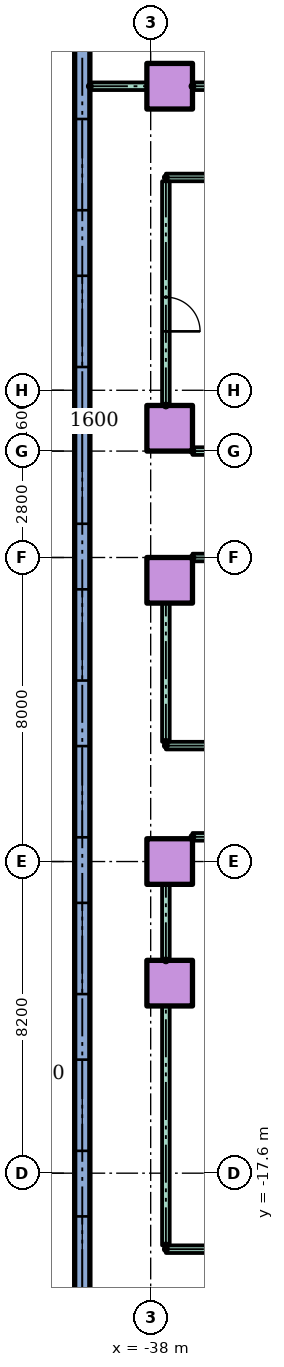
"""IFC4 building model, lengths in metres.
Left out: names, types, materials, properties, quantities, classifications, styles, units other than length and angle.
Written with IfcOpenShell. Run it as: python <this file> out.ifc"""

import sys

from ifc_helpers import new_model, si_unit, direction, frame, frame_2d, origin, origin_2d, place, context, subcontext, project, spatial, rectangle, hollow_rectangle, extrude, element, fill, save


model = new_model("IFC4")
c1 = context("Model", 3, precision=1e-05, world=origin(), true_north=direction((0.0, 1.0)))
c2 = subcontext(c1, "Body", "Model", "MODEL_VIEW")
j1 = project(units=[si_unit("LENGTHUNIT", "METRE"), si_unit("PLANEANGLEUNIT", "RADIAN")], contexts=[c1])
p1 = place(None, origin())
s1 = spatial("IfcSite", under=j1, at=p1, CompositionType="ELEMENT")
p2 = place(p1, origin())
s2 = spatial("IfcBuilding", under=s1, at=p2, CompositionType="ELEMENT")
p3 = place(p2, frame((0.0, 0.0, 14.0)))
s3 = spatial("IfcBuildingStorey", under=s2, at=p3, CompositionType="ELEMENT", Elevation=14.0)
for number, where in (
    (1, (-37.5, -12.6, 0.0)),
    (2, (-37.5, -9.4, 0.0)),
    (3, (-37.5, -2.0, 0.0)),
    (4, (-37.5, 2.0, 0.0)),
    (5, (-37.5, 11.0, 0.0)),
):
    element("IfcColumn", number, at=place(p3, frame(where)), inside=s3, PredefinedType="COLUMN", context=c2, shape_type="SweptSolid", body=[
        extrude(hollow_rectangle(XDim=1.2, YDim=1.2, WallThickness=0.06, at=origin_2d()), origin(), (0.0, 0.0, 1.0), 4.0),
    ])
p4 = place(p3, frame((-39.8, 20.0, 0.0), z_axis=(0.0, 0.0, 1.0), x_axis=(0.0, -1.0, 0.0)))
e6 = element("IfcWall", 6, at=p4, inside=s3, PredefinedType="STANDARD", context=c2, shape_type="SweptSolid", body=[
    extrude(rectangle(XDim=70.0, YDim=0.4, at=frame_2d((35.0, 0.0))), origin(), (0.0, 0.0, 1.0), 3.7),
])
p5 = place(p4, frame((1.05, 0.0, 0.9)))
e7 = element("IfcOpeningElement", 7, at=p5, cuts=e6, PredefinedType="OPENING", context=c2, shape_type="SweptSolid", body=[
    extrude(rectangle(XDim=2.4, YDim=2.1, at=frame_2d((1.2, 1.05))), frame((0.0, 0.21, 0.0), z_axis=(0.0, -1.0, 0.0), x_axis=(1.0, 0.0, 0.0)), (0.0, 0.0, 1.0), 0.42),
])
p6 = place(p4, frame((5.55, 0.0, 0.9)))
e8 = element("IfcOpeningElement", 8, at=p6, cuts=e6, PredefinedType="OPENING", context=c2, shape_type="SweptSolid", body=[
    extrude(rectangle(XDim=2.4, YDim=2.1, at=frame_2d((1.2, 1.05))), frame((0.0, 0.21, 0.0), z_axis=(0.0, -1.0, 0.0), x_axis=(1.0, 0.0, 0.0)), (0.0, 0.0, 1.0), 0.42),
])
p7 = place(p4, frame((9.863, 0.0, 0.9)))
e9 = element("IfcOpeningElement", 9, at=p7, cuts=e6, PredefinedType="OPENING", context=c2, shape_type="SweptSolid", body=[
    extrude(rectangle(XDim=2.4, YDim=2.1, at=frame_2d((1.2, 1.05))), frame((0.0, 0.21, 0.0), z_axis=(0.0, -1.0, 0.0), x_axis=(1.0, 0.0, 0.0)), (0.0, 0.0, 1.0), 0.42),
])
p8 = place(p4, frame((13.988, 0.0, 0.9)))
e10 = element("IfcOpeningElement", 10, at=p8, cuts=e6, PredefinedType="OPENING", context=c2, shape_type="SweptSolid", body=[
    extrude(rectangle(XDim=2.4, YDim=2.1, at=frame_2d((1.2, 1.05))), frame((0.0, 0.21, 0.0), z_axis=(0.0, -1.0, 0.0), x_axis=(1.0, 0.0, 0.0)), (0.0, 0.0, 1.0), 0.42),
])
p9 = place(p4, frame((18.113, 0.0, 0.9)))
e11 = element("IfcOpeningElement", 11, at=p9, cuts=e6, PredefinedType="OPENING", context=c2, shape_type="SweptSolid", body=[
    extrude(rectangle(XDim=2.4, YDim=2.1, at=frame_2d((1.2, 1.05))), frame((0.0, 0.21, 0.0), z_axis=(0.0, -1.0, 0.0), x_axis=(1.0, 0.0, 0.0)), (0.0, 0.0, 1.0), 0.42),
])
p10 = place(p4, frame((22.238, 0.0, 0.9)))
e12 = element("IfcOpeningElement", 12, at=p10, cuts=e6, PredefinedType="OPENING", context=c2, shape_type="SweptSolid", body=[
    extrude(rectangle(XDim=2.4, YDim=2.1, at=frame_2d((1.2, 1.05))), frame((0.0, 0.21, 0.0), z_axis=(0.0, -1.0, 0.0), x_axis=(1.0, 0.0, 0.0)), (0.0, 0.0, 1.0), 0.42),
])
p11 = place(p4, frame((26.363, 0.0, 0.9)))
e13 = element("IfcOpeningElement", 13, at=p11, cuts=e6, PredefinedType="OPENING", context=c2, shape_type="SweptSolid", body=[
    extrude(rectangle(XDim=2.4, YDim=2.1, at=frame_2d((1.2, 1.05))), frame((0.0, 0.21, 0.0), z_axis=(0.0, -1.0, 0.0), x_axis=(1.0, 0.0, 0.0)), (0.0, 0.0, 1.0), 0.42),
])
p12 = place(p4, frame((30.488, 0.0, 0.9)))
e14 = element("IfcOpeningElement", 14, at=p12, cuts=e6, PredefinedType="OPENING", context=c2, shape_type="SweptSolid", body=[
    extrude(rectangle(XDim=2.4, YDim=2.1, at=frame_2d((1.2, 1.05))), frame((0.0, 0.21, 0.0), z_axis=(0.0, -1.0, 0.0), x_axis=(1.0, 0.0, 0.0)), (0.0, 0.0, 1.0), 0.42),
])
p13 = place(p4, frame((34.613, 0.0, 0.9)))
e15 = element("IfcOpeningElement", 15, at=p13, cuts=e6, PredefinedType="OPENING", context=c2, shape_type="SweptSolid", body=[
    extrude(rectangle(XDim=2.4, YDim=2.1, at=frame_2d((1.2, 1.05))), frame((0.0, 0.21, 0.0), z_axis=(0.0, -1.0, 0.0), x_axis=(1.0, 0.0, 0.0)), (0.0, 0.0, 1.0), 0.42),
])
p14 = place(p4, frame((38.738, 0.0, 0.9)))
e16 = element("IfcOpeningElement", 16, at=p14, cuts=e6, PredefinedType="OPENING", context=c2, shape_type="SweptSolid", body=[
    extrude(rectangle(XDim=2.4, YDim=2.1, at=frame_2d((1.2, 1.05))), frame((0.0, 0.21, 0.0), z_axis=(0.0, -1.0, 0.0), x_axis=(1.0, 0.0, 0.0)), (0.0, 0.0, 1.0), 0.42),
])
p15 = place(p4, frame((66.85, 0.0, 0.9)))
e17 = element("IfcOpeningElement", 17, at=p15, cuts=e6, PredefinedType="OPENING", context=c2, shape_type="SweptSolid", body=[
    extrude(rectangle(XDim=2.4, YDim=2.1, at=frame_2d((1.2, 1.05))), frame((0.0, 0.21, 0.0), z_axis=(0.0, -1.0, 0.0), x_axis=(1.0, 0.0, 0.0)), (0.0, 0.0, 1.0), 0.42),
])
p16 = place(p3, frame((-37.6, -19.6, 0.0)))
e18 = element("IfcWall", 18, at=p16, inside=s3, PredefinedType="PARTITIONING", context=c2, shape_type="SweptSolid", body=[
    extrude(rectangle(XDim=75.2, YDim=0.2, at=frame_2d((37.6, 0.0))), origin(), (0.0, 0.0, 1.0), 3.7),
])
p17 = place(p16, frame((2.14, 0.0, 0.0)))
e19 = element("IfcOpeningElement", 19, at=p17, cuts=e18, PredefinedType="OPENING", context=c2, shape_type="SweptSolid", body=[
    extrude(rectangle(XDim=1.0, YDim=2.1, at=frame_2d((0.5, 1.05))), frame((0.0, 0.11, 0.0), z_axis=(0.0, -1.0, 0.0), x_axis=(1.0, 0.0, 0.0)), (0.0, 0.0, 1.0), 0.22),
])
p18 = place(p16, frame((8.86, 0.0, 0.0)))
e20 = element("IfcOpeningElement", 20, at=p18, cuts=e18, PredefinedType="OPENING", context=c2, shape_type="SweptSolid", body=[
    extrude(rectangle(XDim=1.0, YDim=2.1, at=frame_2d((0.5, 1.05))), frame((0.0, 0.11, 0.0), z_axis=(0.0, -1.0, 0.0), x_axis=(1.0, 0.0, 0.0)), (0.0, 0.0, 1.0), 0.22),
])
p19 = place(p16, frame((14.14, 0.0, 0.0)))
e21 = element("IfcOpeningElement", 21, at=p19, cuts=e18, PredefinedType="OPENING", context=c2, shape_type="SweptSolid", body=[
    extrude(rectangle(XDim=1.0, YDim=2.1, at=frame_2d((0.5, 1.05))), frame((0.0, 0.11, 0.0), z_axis=(0.0, -1.0, 0.0), x_axis=(1.0, 0.0, 0.0)), (0.0, 0.0, 1.0), 0.22),
])
p20 = place(p16, frame((20.86, 0.0, 0.0)))
e22 = element("IfcOpeningElement", 22, at=p20, cuts=e18, PredefinedType="OPENING", context=c2, shape_type="SweptSolid", body=[
    extrude(rectangle(XDim=1.0, YDim=2.1, at=frame_2d((0.5, 1.05))), frame((0.0, 0.11, 0.0), z_axis=(0.0, -1.0, 0.0), x_axis=(1.0, 0.0, 0.0)), (0.0, 0.0, 1.0), 0.22),
])
p21 = place(p16, frame((26.14, 0.0, 0.0)))
e23 = element("IfcOpeningElement", 23, at=p21, cuts=e18, PredefinedType="OPENING", context=c2, shape_type="SweptSolid", body=[
    extrude(rectangle(XDim=1.0, YDim=2.1, at=frame_2d((0.5, 1.05))), frame((0.0, 0.11, 0.0), z_axis=(0.0, -1.0, 0.0), x_axis=(1.0, 0.0, 0.0)), (0.0, 0.0, 1.0), 0.22),
])
p22 = place(p16, frame((32.86, 0.0, 0.0)))
e24 = element("IfcOpeningElement", 24, at=p22, cuts=e18, PredefinedType="OPENING", context=c2, shape_type="SweptSolid", body=[
    extrude(rectangle(XDim=1.0, YDim=2.1, at=frame_2d((0.5, 1.05))), frame((0.0, 0.11, 0.0), z_axis=(0.0, -1.0, 0.0), x_axis=(1.0, 0.0, 0.0)), (0.0, 0.0, 1.0), 0.22),
])
p23 = place(p16, frame((39.85, 0.0, 0.0)))
e25 = element("IfcOpeningElement", 25, at=p23, cuts=e18, PredefinedType="OPENING", context=c2, shape_type="SweptSolid", body=[
    extrude(rectangle(XDim=0.9, YDim=2.1, at=frame_2d((0.45, 1.05))), frame((0.0, 0.11, 0.0), z_axis=(0.0, -1.0, 0.0), x_axis=(1.0, 0.0, 0.0)), (0.0, 0.0, 1.0), 0.22),
])
p24 = place(p16, frame((50.1, 0.0, 0.0)))
e26 = element("IfcOpeningElement", 26, at=p24, cuts=e18, PredefinedType="OPENING", context=c2, shape_type="SweptSolid", body=[
    extrude(rectangle(XDim=1.0, YDim=2.1, at=frame_2d((0.5, 1.05))), frame((0.0, 0.11, 0.0), z_axis=(0.0, -1.0, 0.0), x_axis=(1.0, 0.0, 0.0)), (0.0, 0.0, 1.0), 0.22),
])
p25 = place(p16, frame((61.1, 0.0, 0.0)))
e27 = element("IfcOpeningElement", 27, at=p25, cuts=e18, PredefinedType="OPENING", context=c2, shape_type="SweptSolid", body=[
    extrude(rectangle(XDim=1.0, YDim=2.1, at=frame_2d((0.5, 1.05))), frame((0.0, 0.11, 0.0), z_axis=(0.0, -1.0, 0.0), x_axis=(1.0, 0.0, 0.0)), (0.0, 0.0, 1.0), 0.22),
])
p26 = place(p3, frame((-36.9, -8.75, 0.0)))
e28 = element("IfcWall", 28, at=p26, inside=s3, PredefinedType="PARTITIONING", context=c2, shape_type="SweptSolid", body=[
    extrude(rectangle(XDim=73.8, YDim=0.2, at=frame_2d((36.9, 0.0))), origin(), (0.0, 0.0, 1.0), 3.7),
])
p27 = place(p3, frame((-37.6, -6.35, 0.0)))
e29 = element("IfcWall", 29, at=p27, inside=s3, PredefinedType="PARTITIONING", context=c2, shape_type="SweptSolid", body=[
    extrude(rectangle(XDim=75.2, YDim=0.2, at=frame_2d((37.6, 0.0))), origin(), (0.0, 0.0, 1.0), 3.7),
])
p28 = place(p27, frame((4.5, 0.0, 0.0)))
e30 = element("IfcOpeningElement", 30, at=p28, cuts=e29, PredefinedType="OPENING", context=c2, shape_type="SweptSolid", body=[
    extrude(rectangle(XDim=1.0, YDim=2.1, at=frame_2d((0.5, 1.05))), frame((0.0, 0.11, 0.0), z_axis=(0.0, -1.0, 0.0), x_axis=(1.0, 0.0, 0.0)), (0.0, 0.0, 1.0), 0.22),
])
p29 = place(p27, frame((15.5, 0.0, 0.0)))
e31 = element("IfcOpeningElement", 31, at=p29, cuts=e29, PredefinedType="OPENING", context=c2, shape_type="SweptSolid", body=[
    extrude(rectangle(XDim=1.0, YDim=2.1, at=frame_2d((0.5, 1.05))), frame((0.0, 0.11, 0.0), z_axis=(0.0, -1.0, 0.0), x_axis=(1.0, 0.0, 0.0)), (0.0, 0.0, 1.0), 0.22),
])
p30 = place(p27, frame((25.5, 0.0, 0.0)))
e32 = element("IfcOpeningElement", 32, at=p30, cuts=e29, PredefinedType="OPENING", context=c2, shape_type="SweptSolid", body=[
    extrude(rectangle(XDim=1.0, YDim=2.1, at=frame_2d((0.5, 1.05))), frame((0.0, 0.11, 0.0), z_axis=(0.0, -1.0, 0.0), x_axis=(1.0, 0.0, 0.0)), (0.0, 0.0, 1.0), 0.22),
])
p31 = place(p27, frame((34.55, 0.0, 0.0)))
e33 = element("IfcOpeningElement", 33, at=p31, cuts=e29, PredefinedType="OPENING", context=c2, shape_type="SweptSolid", body=[
    extrude(rectangle(XDim=0.9, YDim=2.1, at=frame_2d((0.45, 1.05))), frame((0.0, 0.11, 0.0), z_axis=(0.0, -1.0, 0.0), x_axis=(1.0, 0.0, 0.0)), (0.0, 0.0, 1.0), 0.22),
])
p32 = place(p27, frame((44.604, 0.0, 0.0)))
e34 = element("IfcOpeningElement", 34, at=p32, cuts=e29, PredefinedType="OPENING", context=c2, shape_type="SweptSolid", body=[
    extrude(rectangle(XDim=1.0, YDim=2.1, at=frame_2d((0.5, 1.05))), frame((0.0, 0.11, 0.0), z_axis=(0.0, -1.0, 0.0), x_axis=(1.0, 0.0, 0.0)), (0.0, 0.0, 1.0), 0.22),
])
p33 = place(p27, frame((57.596, 0.0, 0.0)))
e35 = element("IfcOpeningElement", 35, at=p33, cuts=e29, PredefinedType="OPENING", context=c2, shape_type="SweptSolid", body=[
    extrude(rectangle(XDim=1.0, YDim=2.1, at=frame_2d((0.5, 1.05))), frame((0.0, 0.11, 0.0), z_axis=(0.0, -1.0, 0.0), x_axis=(1.0, 0.0, 0.0)), (0.0, 0.0, 1.0), 0.22),
])
p34 = place(p27, frame((68.7, 0.0, 0.0)))
e36 = element("IfcOpeningElement", 36, at=p34, cuts=e29, PredefinedType="OPENING", context=c2, shape_type="SweptSolid", body=[
    extrude(rectangle(XDim=1.0, YDim=2.1, at=frame_2d((0.5, 1.05))), frame((0.0, 0.11, 0.0), z_axis=(0.0, -1.0, 0.0), x_axis=(1.0, 0.0, 0.0)), (0.0, 0.0, 1.0), 0.22),
])
p35 = place(p3, frame((-36.9, -1.4, 0.0)))
e37 = element("IfcWall", 37, at=p35, inside=s3, PredefinedType="PARTITIONING", context=c2, shape_type="SweptSolid", body=[
    extrude(rectangle(XDim=22.9, YDim=0.2, at=frame_2d((11.45, 0.0))), origin(), (0.0, 0.0, 1.0), 3.7),
])
p36 = place(p3, frame((-36.9, 1.4, 0.0)))
e38 = element("IfcWall", 38, at=p36, inside=s3, PredefinedType="PARTITIONING", context=c2, shape_type="SweptSolid", body=[
    extrude(rectangle(XDim=20.6, YDim=0.2, at=frame_2d((10.3, 0.0))), origin(), (0.0, 0.0, 1.0), 3.7),
])
p37 = place(p36, frame((5.25, 0.0, 0.0)))
e39 = element("IfcOpeningElement", 39, at=p37, cuts=e38, PredefinedType="OPENING", context=c2, shape_type="SweptSolid", body=[
    extrude(rectangle(XDim=1.0, YDim=2.1, at=frame_2d((0.5, 1.05))), frame((0.0, 0.11, 0.0), z_axis=(0.0, -1.0, 0.0), x_axis=(1.0, 0.0, 0.0)), (0.0, 0.0, 1.0), 0.22),
])
p38 = place(p36, frame((9.0, 0.0, 0.0)))
e40 = element("IfcOpeningElement", 40, at=p38, cuts=e38, PredefinedType="OPENING", context=c2, shape_type="SweptSolid", body=[
    extrude(rectangle(XDim=1.0, YDim=2.1, at=frame_2d((0.5, 1.05))), frame((0.0, 0.11, 0.0), z_axis=(0.0, -1.0, 0.0), x_axis=(1.0, 0.0, 0.0)), (0.0, 0.0, 1.0), 0.22),
])
p39 = place(p36, frame((12.7, 0.0, 0.0)))
e41 = element("IfcOpeningElement", 41, at=p39, cuts=e38, PredefinedType="OPENING", context=c2, shape_type="SweptSolid", body=[
    extrude(rectangle(XDim=1.0, YDim=2.1, at=frame_2d((0.5, 1.05))), frame((0.0, 0.11, 0.0), z_axis=(0.0, -1.0, 0.0), x_axis=(1.0, 0.0, 0.0)), (0.0, 0.0, 1.0), 0.22),
])
p40 = place(p3, frame((-37.6, 8.6, 0.0)))
e42 = element("IfcWall", 42, at=p40, inside=s3, PredefinedType="PARTITIONING", context=c2, shape_type="SweptSolid", body=[
    extrude(rectangle(XDim=21.3, YDim=0.2, at=frame_2d((10.65, 0.0))), origin(), (0.0, 0.0, 1.0), 3.7),
])
p41 = place(p3, frame((-39.6, 11.0, 0.0)))
e43 = element("IfcWall", 43, at=p41, inside=s3, PredefinedType="PARTITIONING", context=c2, shape_type="SweptSolid", body=[
    extrude(rectangle(XDim=1.5, YDim=0.2, at=frame_2d((0.75, 0.0))), origin(), (0.0, 0.0, 1.0), 3.7),
])
p42 = place(p3, frame((-36.9, 11.0, 0.0)))
e44 = element("IfcWall", 44, at=p42, inside=s3, PredefinedType="PARTITIONING", context=c2, shape_type="SweptSolid", body=[
    extrude(rectangle(XDim=6.4, YDim=0.2, at=frame_2d((3.2, 0.0))), origin(), (0.0, 0.0, 1.0), 3.7),
])
p43 = place(p42, frame((0.802, 0.0, 0.0)))
e45 = element("IfcOpeningElement", 45, at=p43, cuts=e44, PredefinedType="OPENING", context=c2, shape_type="SweptSolid", body=[
    extrude(rectangle(XDim=1.0, YDim=2.1, at=frame_2d((0.5, 1.05))), frame((0.0, 0.11, 0.0), z_axis=(0.0, -1.0, 0.0), x_axis=(1.0, 0.0, 0.0)), (0.0, 0.0, 1.0), 0.22),
])
p44 = place(p42, frame((5.05, 0.0, 0.0)))
e46 = element("IfcOpeningElement", 46, at=p44, cuts=e44, PredefinedType="OPENING", context=c2, shape_type="SweptSolid", body=[
    extrude(rectangle(XDim=1.0, YDim=2.1, at=frame_2d((0.5, 1.05))), frame((0.0, 0.11, 0.0), z_axis=(0.0, -1.0, 0.0), x_axis=(1.0, 0.0, 0.0)), (0.0, 0.0, 1.0), 0.22),
])
p45 = place(p3, frame((-37.6, -19.5, 0.0), z_axis=(0.0, 0.0, 1.0), x_axis=(0.0, 1.0, 0.0)))
e47 = element("IfcWall", 47, at=p45, inside=s3, PredefinedType="PARTITIONING", context=c2, shape_type="SweptSolid", body=[
    extrude(rectangle(XDim=6.3, YDim=0.2, at=frame_2d((3.15, 0.0))), origin(), (0.0, 0.0, 1.0), 3.7),
])
p46 = place(p3, frame((-37.6, -12.0, 0.0), z_axis=(0.0, 0.0, 1.0), x_axis=(0.0, 1.0, 0.0)))
e48 = element("IfcWall", 48, at=p46, inside=s3, PredefinedType="PARTITIONING", context=c2, shape_type="SweptSolid", body=[
    extrude(rectangle(XDim=2.0, YDim=0.2, at=frame_2d((1.0, 0.0))), origin(), (0.0, 0.0, 1.0), 3.7),
])
p47 = place(p3, frame((-37.6, -6.25, 0.0), z_axis=(0.0, 0.0, 1.0), x_axis=(0.0, 1.0, 0.0)))
e49 = element("IfcWall", 49, at=p47, inside=s3, PredefinedType="PARTITIONING", context=c2, shape_type="SweptSolid", body=[
    extrude(rectangle(XDim=3.65, YDim=0.2, at=frame_2d((1.825, 0.0))), origin(), (0.0, 0.0, 1.0), 3.7),
])
p48 = place(p3, frame((-37.6, 2.6, 0.0), z_axis=(0.0, 0.0, 1.0), x_axis=(0.0, 1.0, 0.0)))
e50 = element("IfcWall", 50, at=p48, inside=s3, PredefinedType="PARTITIONING", context=c2, shape_type="SweptSolid", body=[
    extrude(rectangle(XDim=5.9, YDim=0.2, at=frame_2d((2.95, 0.0))), origin(), (0.0, 0.0, 1.0), 3.7),
])
p49 = place(p48, frame((1.95, 0.0, 0.0)))
e51 = element("IfcOpeningElement", 51, at=p49, cuts=e50, PredefinedType="OPENING", context=c2, shape_type="SweptSolid", body=[
    extrude(rectangle(XDim=0.9, YDim=2.1, at=frame_2d((0.45, 1.05))), frame((0.0, 0.11, 0.0), z_axis=(0.0, -1.0, 0.0), x_axis=(1.0, 0.0, 0.0)), (0.0, 0.0, 1.0), 0.22),
])
p50 = place(p7, origin())
e52 = element("IfcWindow", 52, at=p50, inside=s3, PartitioningType="SINGLE_PANEL", PredefinedType="WINDOW", context=c2, shape_type="SweptSolid", body=[
    extrude(rectangle(XDim=2.4, YDim=2.1, at=frame_2d((1.2, 1.05))), frame((0.0, 0.03, 0.0), z_axis=(0.0, -1.0, 0.0), x_axis=(1.0, 0.0, 0.0)), (0.0, 0.0, 1.0), 0.06),
])
fill(e9, e52)
p51 = place(p8, origin())
e53 = element("IfcWindow", 53, at=p51, inside=s3, PartitioningType="SINGLE_PANEL", PredefinedType="WINDOW", context=c2, shape_type="SweptSolid", body=[
    extrude(rectangle(XDim=2.4, YDim=2.1, at=frame_2d((1.2, 1.05))), frame((0.0, 0.03, 0.0), z_axis=(0.0, -1.0, 0.0), x_axis=(1.0, 0.0, 0.0)), (0.0, 0.0, 1.0), 0.06),
])
fill(e10, e53)
p52 = place(p9, origin())
e54 = element("IfcWindow", 54, at=p52, inside=s3, PartitioningType="SINGLE_PANEL", PredefinedType="WINDOW", context=c2, shape_type="SweptSolid", body=[
    extrude(rectangle(XDim=2.4, YDim=2.1, at=frame_2d((1.2, 1.05))), frame((0.0, 0.03, 0.0), z_axis=(0.0, -1.0, 0.0), x_axis=(1.0, 0.0, 0.0)), (0.0, 0.0, 1.0), 0.06),
])
fill(e11, e54)
p53 = place(p10, origin())
e55 = element("IfcWindow", 55, at=p53, inside=s3, PartitioningType="SINGLE_PANEL", PredefinedType="WINDOW", context=c2, shape_type="SweptSolid", body=[
    extrude(rectangle(XDim=2.4, YDim=2.1, at=frame_2d((1.2, 1.05))), frame((0.0, 0.03, 0.0), z_axis=(0.0, -1.0, 0.0), x_axis=(1.0, 0.0, 0.0)), (0.0, 0.0, 1.0), 0.06),
])
fill(e12, e55)
p54 = place(p11, origin())
e56 = element("IfcWindow", 56, at=p54, inside=s3, PartitioningType="SINGLE_PANEL", PredefinedType="WINDOW", context=c2, shape_type="SweptSolid", body=[
    extrude(rectangle(XDim=2.4, YDim=2.1, at=frame_2d((1.2, 1.05))), frame((0.0, 0.03, 0.0), z_axis=(0.0, -1.0, 0.0), x_axis=(1.0, 0.0, 0.0)), (0.0, 0.0, 1.0), 0.06),
])
fill(e13, e56)
p55 = place(p12, origin())
e57 = element("IfcWindow", 57, at=p55, inside=s3, PartitioningType="SINGLE_PANEL", PredefinedType="WINDOW", context=c2, shape_type="SweptSolid", body=[
    extrude(rectangle(XDim=2.4, YDim=2.1, at=frame_2d((1.2, 1.05))), frame((0.0, 0.03, 0.0), z_axis=(0.0, -1.0, 0.0), x_axis=(1.0, 0.0, 0.0)), (0.0, 0.0, 1.0), 0.06),
])
fill(e14, e57)
p56 = place(p13, origin())
e58 = element("IfcWindow", 58, at=p56, inside=s3, PartitioningType="SINGLE_PANEL", PredefinedType="WINDOW", context=c2, shape_type="SweptSolid", body=[
    extrude(rectangle(XDim=2.4, YDim=2.1, at=frame_2d((1.2, 1.05))), frame((0.0, 0.03, 0.0), z_axis=(0.0, -1.0, 0.0), x_axis=(1.0, 0.0, 0.0)), (0.0, 0.0, 1.0), 0.06),
])
fill(e15, e58)
p57 = place(p14, origin())
e59 = element("IfcWindow", 59, at=p57, inside=s3, PartitioningType="SINGLE_PANEL", PredefinedType="WINDOW", context=c2, shape_type="SweptSolid", body=[
    extrude(rectangle(XDim=2.4, YDim=2.1, at=frame_2d((1.2, 1.05))), frame((0.0, 0.03, 0.0), z_axis=(0.0, -1.0, 0.0), x_axis=(1.0, 0.0, 0.0)), (0.0, 0.0, 1.0), 0.06),
])
fill(e16, e59)
p58 = place(p49, frame((0.9, 0.0, 0.0), z_axis=(0.0, 0.0, 1.0), x_axis=(-1.0, 0.0, 0.0)))
e60 = element("IfcDoor", 60, at=p58, inside=s3, OperationType="SINGLE_SWING_LEFT", PredefinedType="DOOR", context=c2, shape_type="SweptSolid", body=[
    extrude(rectangle(XDim=0.9, YDim=2.1, at=frame_2d((0.45, 1.05))), frame((0.0, 0.025, 0.0), z_axis=(0.0, -1.0, 0.0), x_axis=(1.0, 0.0, 0.0)), (0.0, 0.0, 1.0), 0.05),
])
fill(e51, e60)
save(model, sys.argv[1])
